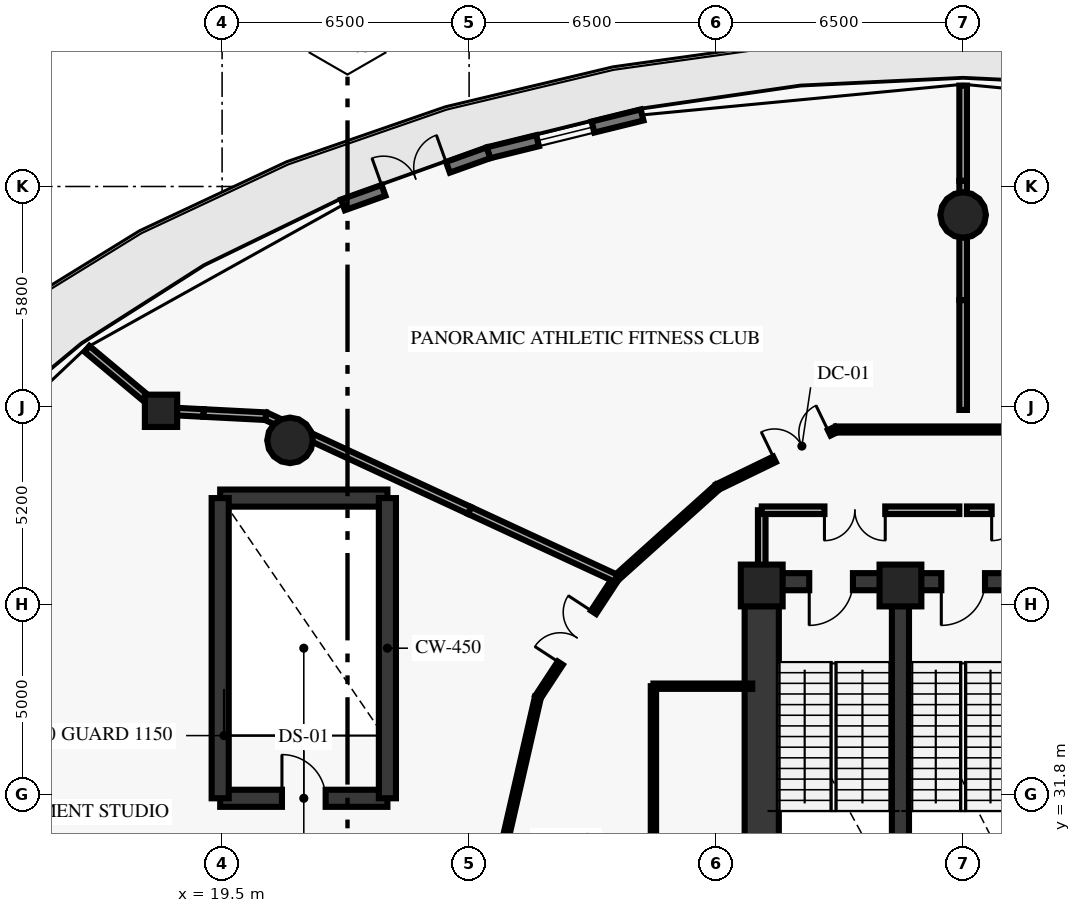
"""IFC4 building model, lengths in metres.
Left out: names, types, materials, properties, quantities, classifications, styles, units other than length and angle.
Written with IfcOpenShell. Run it as: python <this file> out.ifc"""

import sys

from ifc_helpers import new_model, si_unit, direction, frame, frame_2d, origin, origin_2d, place, context, subcontext, project, spatial, rectangle, circle, extrude, element, fill, save


model = new_model("IFC4")
c1 = context("Model", 3, precision=1e-05, world=origin(), true_north=direction((0.0, 1.0)))
c2 = subcontext(c1, "Body", "Model", "MODEL_VIEW")
j1 = project(units=[si_unit("LENGTHUNIT", "METRE"), si_unit("PLANEANGLEUNIT", "RADIAN")], contexts=[c1])
p1 = place(None, origin())
s1 = spatial("IfcSite", under=j1, at=p1, CompositionType="ELEMENT")
p2 = place(p1, origin())
s2 = spatial("IfcBuilding", under=s1, at=p2, CompositionType="ELEMENT")
p3 = place(p2, frame((0.0, 0.0, 16.0)))
s3 = spatial("IfcBuildingStorey", under=s2, at=p3, CompositionType="ELEMENT", Elevation=16.0)
for number, where, z_axis, x_axis in (
    (1, (37.35, 37.3, 0.0), (0.0, 0.0, 1.0), (1.0, 0.0, 0.0)),
    (2, (33.7, 37.3, 0.0), (0.0, 0.0, 1.0), (1.0, 0.0, 0.0)),
):
    element("IfcColumn", number, at=place(p3, frame(where, z_axis=z_axis, x_axis=x_axis)), inside=s3, PredefinedType="PILASTER", context=c2, shape_type="SweptSolid", body=[
        extrude(rectangle(XDim=1.1, YDim=1.1, at=origin_2d()), origin(), (0.0, 0.0, 1.0), 4.74),
    ])
for number, where, z_axis, x_axis in (
    (3, (39.0, 47.05, 0.0), (0.0, 0.0, 1.0), (1.0, 0.0, 0.0)),
    (4, (21.287, 41.119, 0.0), (0.0, 0.0, 1.0), (1.0, 0.0, 0.0)),
):
    element("IfcColumn", number, at=place(p3, frame(where, z_axis=z_axis, x_axis=x_axis)), inside=s3, PredefinedType="COLUMN", context=c2, shape_type="SweptSolid", body=[
        extrude(circle(Radius=0.6, at=origin_2d()), origin(), (0.0, 0.0, 1.0), 4.74),
    ])
p4 = place(p3, frame((17.893, 41.897, 0.0), z_axis=(0.0, 0.0, 1.0), x_axis=(1.0, 0.0, 0.0)))
e5 = element("IfcColumn", 5, at=p4, inside=s3, PredefinedType="COLUMN", context=c2, shape_type="SweptSolid", body=[
    extrude(rectangle(XDim=0.85, YDim=0.85, at=origin_2d()), origin(), (0.0, 0.0, 1.0), 4.74),
])
p5 = place(p3, frame((33.7, 29.05, 0.0), z_axis=(0.0, 0.0, 1.0), x_axis=(0.0, 1.0, 0.0)))
e6 = element("IfcWall", 6, at=p5, inside=s3, PredefinedType="SHEAR", context=c2, shape_type="SweptSolid", body=[
    extrude(rectangle(XDim=8.35, YDim=0.9, at=frame_2d((4.175, 0.0))), origin(), (0.0, 0.0, 1.0), 4.74),
])
p6 = place(p3, frame((26.509, 48.687, 0.0), z_axis=(0.0, 0.0, 1.0), x_axis=(0.970964611728, 0.239223165208, 0.0)))
e7 = element("IfcWall", 7, at=p6, inside=s3, PredefinedType="STANDARD", context=c2, shape_type="SweptSolid", body=[
    extrude(rectangle(XDim=4.164, YDim=0.3, at=frame_2d((2.082, 0.0))), origin(), (0.0, 0.0, 1.0), 4.74),
])
p7 = place(p6, frame((1.332, 0.0, 0.9)))
e8 = element("IfcOpeningElement", 8, at=p7, cuts=e7, PredefinedType="OPENING", context=c2, shape_type="SweptSolid", body=[
    extrude(rectangle(XDim=1.5, YDim=2.2, at=frame_2d((0.75, 1.1))), frame((0.0, 0.16, 0.0), z_axis=(0.0, -1.0, 0.0), x_axis=(1.0, 0.0, 0.0)), (0.0, 0.0, 1.0), 0.32),
])
p8 = place(p3, frame((22.68, 47.316, 0.0), z_axis=(0.0, 0.0, 1.0), x_axis=(0.941464544091, 0.337112017318, 0.0)))
e9 = element("IfcWall", 9, at=p8, inside=s3, PredefinedType="STANDARD", context=c2, shape_type="SweptSolid", body=[
    extrude(rectangle(XDim=4.067, YDim=0.3, at=frame_2d((2.034, 0.0))), origin(), (0.0, 0.0, 1.0), 4.74),
])
p9 = place(p8, frame((1.134, 0.0, 0.0)))
e10 = element("IfcOpeningElement", 10, at=p9, cuts=e9, PredefinedType="OPENING", context=c2, shape_type="SweptSolid", body=[
    extrude(rectangle(XDim=1.8, YDim=2.25, at=frame_2d((0.9, 1.125))), frame((0.0, 0.16, 0.0), z_axis=(0.0, -1.0, 0.0), x_axis=(1.0, 0.0, 0.0)), (0.0, 0.0, 1.0), 0.32),
])
p10 = place(p3, frame((37.35, 37.4, 0.0), z_axis=(0.0, 0.0, 1.0), x_axis=(-1.0, 0.0, 0.0)))
e11 = element("IfcWall", 11, at=p10, inside=s3, PredefinedType="SHEAR", context=c2, shape_type="SweptSolid", body=[
    extrude(rectangle(XDim=3.65, YDim=0.45, at=frame_2d((1.825, 0.0))), origin(), (0.0, 0.0, 1.0), 4.74),
])
p11 = place(p10, frame((1.25, 0.0, 0.0)))
e12 = element("IfcOpeningElement", 12, at=p11, cuts=e11, PredefinedType="OPENING", context=c2, shape_type="SweptSolid", body=[
    extrude(rectangle(XDim=1.15, YDim=2.15, at=frame_2d((0.575, 1.075))), frame((0.0, 0.235, 0.0), z_axis=(0.0, -1.0, 0.0), x_axis=(1.0, 0.0, 0.0)), (0.0, 0.0, 1.0), 0.47),
])
p12 = place(p3, frame((37.35, 29.05, 0.0), z_axis=(0.0, 0.0, 1.0), x_axis=(0.0, 1.0, 0.0)))
e13 = element("IfcWall", 13, at=p12, inside=s3, PredefinedType="SHEAR", context=c2, shape_type="SweptSolid", body=[
    extrude(rectangle(XDim=8.35, YDim=0.45, at=frame_2d((4.175, 0.0))), origin(), (0.0, 0.0, 1.0), 4.74),
])
p13 = place(p3, frame((40.65, 37.4, 0.0), z_axis=(0.0, 0.0, 1.0), x_axis=(-1.0, 0.0, 0.0)))
e14 = element("IfcWall", 14, at=p13, inside=s3, PredefinedType="SHEAR", context=c2, shape_type="SweptSolid", body=[
    extrude(rectangle(XDim=3.3, YDim=0.45, at=frame_2d((1.65, 0.0))), origin(), (0.0, 0.0, 1.0), 4.74),
])
p14 = place(p13, frame((1.075, 0.0, 0.0)))
e15 = element("IfcOpeningElement", 15, at=p14, cuts=e14, PredefinedType="OPENING", context=c2, shape_type="SweptSolid", body=[
    extrude(rectangle(XDim=1.15, YDim=2.15, at=frame_2d((0.575, 1.075))), frame((0.0, 0.235, 0.0), z_axis=(0.0, -1.0, 0.0), x_axis=(1.0, 0.0, 0.0)), (0.0, 0.0, 1.0), 0.47),
])
p15 = place(p3, frame((19.45, 31.7, 0.0), z_axis=(0.0, 0.0, 1.0), x_axis=(1.0, 0.0, 0.0)))
e16 = element("IfcWall", 16, at=p15, inside=s3, PredefinedType="SHEAR", context=c2, shape_type="SweptSolid", body=[
    extrude(rectangle(XDim=4.4, YDim=0.45, at=frame_2d((2.2, 0.0))), origin(), (0.0, 0.0, 1.0), 4.74),
])
p16 = place(p15, frame((1.625, 0.0, 0.0)))
e17 = element("IfcOpeningElement", 17, at=p16, cuts=e16, PredefinedType="OPENING", context=c2, shape_type="SweptSolid", body=[
    extrude(rectangle(XDim=1.15, YDim=2.15, at=frame_2d((0.575, 1.075))), frame((0.0, 0.235, 0.0), z_axis=(0.0, -1.0, 0.0), x_axis=(1.0, 0.0, 0.0)), (0.0, 0.0, 1.0), 0.47),
])
p17 = place(p3, frame((19.45, 39.6, 0.0), z_axis=(0.0, 0.0, 1.0), x_axis=(1.0, 0.0, 0.0)))
e18 = element("IfcWall", 18, at=p17, inside=s3, PredefinedType="SHEAR", context=c2, shape_type="SweptSolid", body=[
    extrude(rectangle(XDim=4.4, YDim=0.45, at=frame_2d((2.2, 0.0))), origin(), (0.0, 0.0, 1.0), 4.74),
])
for number, where, z_axis, x_axis in (
    (19, (19.45, 31.7, 0.0), (0.0, 0.0, 1.0), (0.0, 1.0, 0.0)),
    (20, (23.85, 31.7, 0.0), (0.0, 0.0, 1.0), (0.0, 1.0, 0.0)),
):
    element("IfcWall", number, at=place(p3, frame(where, z_axis=z_axis, x_axis=x_axis)), inside=s3, PredefinedType="SHEAR", context=c2, shape_type="SweptSolid", body=[
        extrude(rectangle(XDim=7.9, YDim=0.45, at=frame_2d((3.95, 0.0))), origin(), (0.0, 0.0, 1.0), 4.74),
    ])
p18 = place(p3, frame((33.7, 37.4, 0.0), z_axis=(0.0, 0.0, 1.0), x_axis=(0.0, 1.0, 0.0)))
e21 = element("IfcWall", 21, at=p18, inside=s3, PredefinedType="SOLIDWALL", context=c2, shape_type="SweptSolid", body=[
    extrude(rectangle(XDim=1.88, YDim=0.2, at=frame_2d((0.94, 0.0))), origin(), (0.0, 0.0, 1.0), 4.74),
])
p19 = place(p3, frame((38.9, 39.28, 0.0), z_axis=(0.0, 0.0, 1.0), x_axis=(-1.0, 0.0, 0.0)))
e22 = element("IfcWall", 22, at=p19, inside=s3, PredefinedType="SOLIDWALL", context=c2, shape_type="SweptSolid", body=[
    extrude(rectangle(XDim=5.2, YDim=0.2, at=frame_2d((2.6, 0.0))), origin(), (0.0, 0.0, 1.0), 4.74),
])
p20 = place(p19, frame((1.95, 0.0, 0.0)))
e23 = element("IfcOpeningElement", 23, at=p20, cuts=e22, PredefinedType="OPENING", context=c2, shape_type="SweptSolid", body=[
    extrude(rectangle(XDim=1.6, YDim=2.2, at=frame_2d((0.8, 1.1))), frame((0.0, 0.11, 0.0), z_axis=(0.0, -1.0, 0.0), x_axis=(1.0, 0.0, 0.0)), (0.0, 0.0, 1.0), 0.22),
])
p21 = place(p3, frame((45.7, 39.28, 0.0), z_axis=(0.0, 0.0, 1.0), x_axis=(-1.0, 0.0, 0.0)))
e24 = element("IfcWall", 24, at=p21, inside=s3, PredefinedType="SOLIDWALL", context=c2, shape_type="SweptSolid", body=[
    extrude(rectangle(XDim=6.6, YDim=0.2, at=frame_2d((3.3, 0.0))), origin(), (0.0, 0.0, 1.0), 4.74),
])
p22 = place(p21, frame((4.35, 0.0, 0.0)))
e25 = element("IfcOpeningElement", 25, at=p22, cuts=e24, PredefinedType="OPENING", context=c2, shape_type="SweptSolid", body=[
    extrude(rectangle(XDim=1.6, YDim=2.2, at=frame_2d((0.8, 1.1))), frame((0.0, 0.11, 0.0), z_axis=(0.0, -1.0, 0.0), x_axis=(1.0, 0.0, 0.0)), (0.0, 0.0, 1.0), 0.22),
])
p23 = place(p3, frame((30.85, 34.65, 0.0), z_axis=(0.0, 0.0, 1.0), x_axis=(1.0, 0.0, 0.0)))
e26 = element("IfcWall", 26, at=p23, inside=s3, PredefinedType="PARTITIONING", context=c2, shape_type="SweptSolid", body=[
    extrude(rectangle(XDim=2.6, YDim=0.14, at=frame_2d((1.3, 0.0))), origin(), (0.0, 0.0, 1.0), 4.74),
])
p24 = place(p3, frame((30.85, 29.05, 0.0), z_axis=(0.0, 0.0, 1.0), x_axis=(0.0, 1.0, 0.0)))
e27 = element("IfcWall", 27, at=p24, inside=s3, PredefinedType="PARTITIONING", context=c2, shape_type="SweptSolid", body=[
    extrude(rectangle(XDim=5.6, YDim=0.14, at=frame_2d((2.8, 0.0))), origin(), (0.0, 0.0, 1.0), 4.74),
])
p25 = place(p3, frame((42.344, 41.405, 0.0), z_axis=(0.0, 0.0, 1.0), x_axis=(-1.0, 0.0, 0.0)))
e28 = element("IfcWall", 28, at=p25, inside=s3, PredefinedType="PARTITIONING", context=c2, shape_type="SweptSolid", body=[
    extrude(rectangle(XDim=6.688, YDim=0.16, at=frame_2d((3.344, 0.0))), origin(), (0.0, 0.0, 1.0), 4.74),
])
p26 = place(p3, frame((32.54, 39.894, 0.0), z_axis=(0.0, 0.0, 1.0), x_axis=(0.899789784655, 0.436323668199, 0.0)))
e29 = element("IfcWall", 29, at=p26, inside=s3, PredefinedType="PARTITIONING", context=c2, shape_type="SweptSolid", body=[
    extrude(rectangle(XDim=3.463, YDim=0.16, at=frame_2d((1.731, 0.0))), origin(), (0.0, 0.0, 1.0), 4.74),
])
p27 = place(p26, frame((1.663, 0.0, 0.0)))
e30 = element("IfcOpeningElement", 30, at=p27, cuts=e29, PredefinedType="OPENING", context=c2, shape_type="SweptSolid", body=[
    extrude(rectangle(XDim=1.6, YDim=2.2, at=frame_2d((0.8, 1.1))), frame((0.0, 0.09, 0.0), z_axis=(0.0, -1.0, 0.0), x_axis=(1.0, 0.0, 0.0)), (0.0, 0.0, 1.0), 0.18),
])
p28 = place(p3, frame((32.54, 39.894, 0.0), z_axis=(0.0, 0.0, 1.0), x_axis=(-0.744032872127, -0.668143012531, 0.0)))
e31 = element("IfcWall", 31, at=p28, inside=s3, PredefinedType="PARTITIONING", context=c2, shape_type="SweptSolid", body=[
    extrude(rectangle(XDim=3.597, YDim=0.16, at=frame_2d((1.798, 0.0))), origin(), (0.0, 0.0, 1.0), 4.74),
])
p29 = place(p3, frame((27.811, 34.36, 0.0), z_axis=(0.0, 0.0, 1.0), x_axis=(0.548348738977, 0.836249759619, 0.0)))
e32 = element("IfcWall", 32, at=p29, inside=s3, PredefinedType="PARTITIONING", context=c2, shape_type="SweptSolid", body=[
    extrude(rectangle(XDim=3.744, YDim=0.16, at=frame_2d((1.872, 0.0))), origin(), (0.0, 0.0, 1.0), 4.74),
])
p30 = place(p29, frame((1.072, 0.0, 0.0)))
e33 = element("IfcOpeningElement", 33, at=p30, cuts=e32, PredefinedType="OPENING", context=c2, shape_type="SweptSolid", body=[
    extrude(rectangle(XDim=1.6, YDim=2.2, at=frame_2d((0.8, 1.1))), frame((0.0, 0.09, 0.0), z_axis=(0.0, -1.0, 0.0), x_axis=(1.0, 0.0, 0.0)), (0.0, 0.0, 1.0), 0.18),
])
p31 = place(p3, frame((27.811, 34.36, 0.0), z_axis=(0.0, 0.0, 1.0), x_axis=(-0.223185487206, -0.974775993909, 0.0)))
e34 = element("IfcWall", 34, at=p31, inside=s3, PredefinedType="PARTITIONING", context=c2, shape_type="SweptSolid", body=[
    extrude(rectangle(XDim=7.756, YDim=0.16, at=frame_2d((3.878, 0.0))), origin(), (0.0, 0.0, 1.0), 4.74),
])
p32 = place(p3, frame((39.0, 41.92, 0.0), z_axis=(0.0, 0.0, 1.0), x_axis=(0.0, 1.0, 0.0)))
e35 = element("IfcWall", 35, at=p32, inside=s3, PredefinedType="PARTITIONING", context=c2, shape_type="SweptSolid", body=[
    extrude(rectangle(XDim=2.891, YDim=0.2, at=frame_2d((1.446, 0.0))), origin(), (0.0, 0.0, 1.0), 4.74),
])
p33 = place(p3, frame((39.0, 44.811, 0.0), z_axis=(0.0, 0.0, 1.0), x_axis=(0.0, 1.0, 0.0)))
e36 = element("IfcWall", 36, at=p33, inside=s3, PredefinedType="PARTITIONING", context=c2, shape_type="SweptSolid", body=[
    extrude(rectangle(XDim=2.256, YDim=0.2, at=frame_2d((1.128, 0.0))), origin(), (0.0, 0.0, 1.0), 3.09),
])
p34 = place(p3, frame((39.0, 47.067, 0.0), z_axis=(0.0, 0.0, 1.0), x_axis=(0.0, 1.0, 0.0)))
e37 = element("IfcWall", 37, at=p34, inside=s3, PredefinedType="PARTITIONING", context=c2, shape_type="SweptSolid", body=[
    extrude(rectangle(XDim=0.883, YDim=0.2, at=frame_2d((0.441, 0.0))), origin(), (0.0, 0.0, 1.0), 4.74),
])
p35 = place(p3, frame((39.0, 47.95, 0.0), z_axis=(0.0, 0.0, 1.0), x_axis=(0.0, 1.0, 0.0)))
e38 = element("IfcWall", 38, at=p35, inside=s3, PredefinedType="PARTITIONING", context=c2, shape_type="SweptSolid", body=[
    extrude(rectangle(XDim=2.505, YDim=0.2, at=frame_2d((1.252, 0.0))), origin(), (0.0, 0.0, 1.0), 4.74),
])
p36 = place(p3, frame((29.864, 37.491, 0.0), z_axis=(0.0, 0.0, 1.0), x_axis=(-0.907543218971, 0.419958695231, 0.0)))
e39 = element("IfcWall", 39, at=p36, inside=s3, PredefinedType="PARTITIONING", context=c2, shape_type="SweptSolid", body=[
    extrude(rectangle(XDim=4.246, YDim=0.2, at=frame_2d((2.123, 0.0))), origin(), (0.0, 0.0, 1.0), 4.74),
])
p37 = place(p3, frame((26.011, 39.274, 0.0), z_axis=(0.0, 0.0, 1.0), x_axis=(-0.907468259345, 0.420120647293, 0.0)))
e40 = element("IfcWall", 40, at=p37, inside=s3, PredefinedType="PARTITIONING", context=c2, shape_type="SweptSolid", body=[
    extrude(rectangle(XDim=5.099, YDim=0.2, at=frame_2d((2.549, 0.0))), origin(), (0.0, 0.0, 1.0), 2.94),
])
p38 = place(p3, frame((21.384, 41.416, 0.0), z_axis=(0.0, 0.0, 1.0), x_axis=(-0.907729224474, 0.419556498025, 0.0)))
e41 = element("IfcWall", 41, at=p38, inside=s3, PredefinedType="PARTITIONING", context=c2, shape_type="SweptSolid", body=[
    extrude(rectangle(XDim=0.808, YDim=0.2, at=frame_2d((0.404, 0.0))), origin(), (0.0, 0.0, 1.0), 4.74),
])
p39 = place(p3, frame((20.651, 41.755, 0.0), z_axis=(0.0, 0.0, 1.0), x_axis=(-0.998685128887, 0.051264152576, 0.0)))
e42 = element("IfcWall", 42, at=p39, inside=s3, PredefinedType="PARTITIONING", context=c2, shape_type="SweptSolid", body=[
    extrude(rectangle(XDim=1.643, YDim=0.2, at=frame_2d((0.822, 0.0))), origin(), (0.0, 0.0, 1.0), 4.74),
])
p40 = place(p3, frame((19.01, 41.839, 0.0), z_axis=(0.0, 0.0, 1.0), x_axis=(-0.998660904733, 0.051733909163, 0.0)))
e43 = element("IfcWall", 43, at=p40, inside=s3, PredefinedType="PARTITIONING", context=c2, shape_type="SweptSolid", body=[
    extrude(rectangle(XDim=1.118, YDim=0.2, at=frame_2d((0.559, 0.0))), origin(), (0.0, 0.0, 1.0), 4.28),
])
p41 = place(p3, frame((17.893, 41.897, 0.0), z_axis=(0.0, 0.0, 1.0), x_axis=(-0.766903980595, 0.641761859686, 0.0)))
e44 = element("IfcWall", 44, at=p41, inside=s3, PredefinedType="PARTITIONING", context=c2, shape_type="SweptSolid", body=[
    extrude(rectangle(XDim=2.54, YDim=0.2, at=frame_2d((1.27, 0.0))), origin(), (0.0, 0.0, 1.0), 4.74),
])
p42 = place(p7, origin())
e45 = element("IfcWindow", 45, at=p42, inside=s3, PartitioningType="DOUBLE_PANEL_VERTICAL", PredefinedType="WINDOW", context=c2, shape_type="SweptSolid", body=[
    extrude(rectangle(XDim=1.5, YDim=2.2, at=frame_2d((0.75, 1.1))), frame((0.0, 0.03, 0.0), z_axis=(0.0, -1.0, 0.0), x_axis=(1.0, 0.0, 0.0)), (0.0, 0.0, 1.0), 0.06),
])
fill(e8, e45)
p43 = place(p9, origin())
e46 = element("IfcDoor", 46, at=p43, inside=s3, OperationType="DOUBLE_DOOR_SINGLE_SWING", PredefinedType="DOOR", context=c2, shape_type="SweptSolid", body=[
    extrude(rectangle(XDim=1.8, YDim=2.25, at=frame_2d((0.9, 1.125))), frame((0.0, 0.025, 0.0), z_axis=(0.0, -1.0, 0.0), x_axis=(1.0, 0.0, 0.0)), (0.0, 0.0, 1.0), 0.05),
])
fill(e10, e46)
p44 = place(p11, origin())
e47 = element("IfcDoor", 47, at=p44, inside=s3, OperationType="SINGLE_SWING_RIGHT", PredefinedType="DOOR", context=c2, shape_type="SweptSolid", body=[
    extrude(rectangle(XDim=1.15, YDim=2.15, at=frame_2d((0.575, 1.075))), frame((0.0, 0.025, 0.0), z_axis=(0.0, -1.0, 0.0), x_axis=(1.0, 0.0, 0.0)), (0.0, 0.0, 1.0), 0.05),
])
fill(e12, e47)
p45 = place(p14, origin())
e48 = element("IfcDoor", 48, at=p45, inside=s3, OperationType="SINGLE_SWING_RIGHT", PredefinedType="DOOR", context=c2, shape_type="SweptSolid", body=[
    extrude(rectangle(XDim=1.15, YDim=2.15, at=frame_2d((0.575, 1.075))), frame((0.0, 0.025, 0.0), z_axis=(0.0, -1.0, 0.0), x_axis=(1.0, 0.0, 0.0)), (0.0, 0.0, 1.0), 0.05),
])
fill(e15, e48)
p46 = place(p16, origin())
e49 = element("IfcDoor", 49, at=p46, inside=s3, OperationType="SINGLE_SWING_LEFT", PredefinedType="DOOR", context=c2, shape_type="SweptSolid", body=[
    extrude(rectangle(XDim=1.15, YDim=2.15, at=frame_2d((0.575, 1.075))), frame((0.0, 0.025, 0.0), z_axis=(0.0, -1.0, 0.0), x_axis=(1.0, 0.0, 0.0)), (0.0, 0.0, 1.0), 0.05),
])
fill(e17, e49)
p47 = place(p20, origin())
e50 = element("IfcDoor", 50, at=p47, inside=s3, OperationType="DOUBLE_DOOR_SINGLE_SWING", PredefinedType="DOOR", context=c2, shape_type="SweptSolid", body=[
    extrude(rectangle(XDim=1.6, YDim=2.2, at=frame_2d((0.8, 1.1))), frame((0.0, 0.025, 0.0), z_axis=(0.0, -1.0, 0.0), x_axis=(1.0, 0.0, 0.0)), (0.0, 0.0, 1.0), 0.05),
])
fill(e23, e50)
p48 = place(p22, origin())
e51 = element("IfcDoor", 51, at=p48, inside=s3, OperationType="DOUBLE_DOOR_SINGLE_SWING", PredefinedType="DOOR", context=c2, shape_type="SweptSolid", body=[
    extrude(rectangle(XDim=1.6, YDim=2.2, at=frame_2d((0.8, 1.1))), frame((0.0, 0.025, 0.0), z_axis=(0.0, -1.0, 0.0), x_axis=(1.0, 0.0, 0.0)), (0.0, 0.0, 1.0), 0.05),
])
fill(e25, e51)
p49 = place(p27, origin())
e52 = element("IfcDoor", 52, at=p49, inside=s3, OperationType="DOUBLE_DOOR_SINGLE_SWING", PredefinedType="DOOR", context=c2, shape_type="SweptSolid", body=[
    extrude(rectangle(XDim=1.6, YDim=2.2, at=frame_2d((0.8, 1.1))), frame((0.0, 0.025, 0.0), z_axis=(0.0, -1.0, 0.0), x_axis=(1.0, 0.0, 0.0)), (0.0, 0.0, 1.0), 0.05),
])
fill(e30, e52)
p50 = place(p30, origin())
e53 = element("IfcDoor", 53, at=p50, inside=s3, OperationType="DOUBLE_DOOR_SINGLE_SWING", PredefinedType="DOOR", context=c2, shape_type="SweptSolid", body=[
    extrude(rectangle(XDim=1.6, YDim=2.2, at=frame_2d((0.8, 1.1))), frame((0.0, 0.025, 0.0), z_axis=(0.0, -1.0, 0.0), x_axis=(1.0, 0.0, 0.0)), (0.0, 0.0, 1.0), 0.05),
])
fill(e33, e53)
save(model, sys.argv[1])
